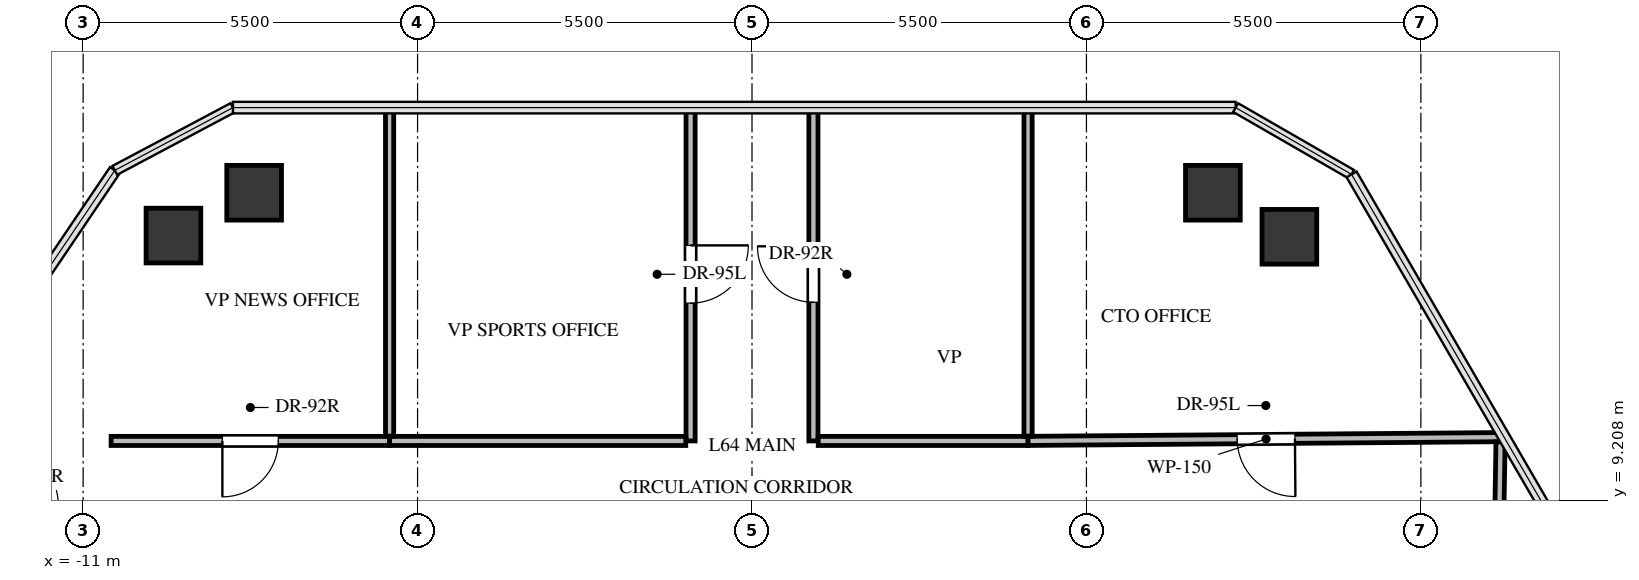
"""IFC4 building model, lengths in metres.
Left out: names, types, materials, properties, quantities, classifications, styles, units other than length and angle.
Written with IfcOpenShell. Run it as: python <this file> out.ifc"""

import sys

from ifc_helpers import new_model, si_unit, direction, frame, frame_2d, origin, origin_2d, place, context, subcontext, project, spatial, rectangle, extrude, source, transform, mapped, element, fill, save


model = new_model("IFC4")
c1 = context("Model", 3, precision=1e-05, world=origin(), true_north=direction((0.0, 1.0)))
c2 = subcontext(c1, "Body", "Model", "MODEL_VIEW")
j1 = project(units=[si_unit("LENGTHUNIT", "METRE"), si_unit("PLANEANGLEUNIT", "RADIAN")], contexts=[c1])
p1 = place(None, origin())
s1 = spatial("IfcSite", under=j1, at=p1, CompositionType="ELEMENT")
p2 = place(p1, origin())
s2 = spatial("IfcBuilding", under=s1, at=p2, CompositionType="ELEMENT")
p3 = place(p2, frame((0.0, 0.0, 231.5)))
s3 = spatial("IfcBuildingStorey", under=s2, at=p3, CompositionType="ELEMENT", Elevation=231.5)
m1 = source(origin(), c2, "Body", "SweptSolid", [
    extrude(rectangle(XDim=0.9, YDim=0.9, at=origin_2d()), origin(), (0.0, 0.0, 1.0), 3.3),
])
for number, where, z_axis, x_axis in (
    (1, (-9.515, 13.557, -0.24), (0.0, 0.0, 1.0), (1.0, 0.0, 0.0)),
    (2, (-8.188, 14.262, -0.24), (0.0, 0.0, 1.0), (1.0, 0.0, 0.0)),
    (3, (7.58, 14.262, -0.24), (0.0, 0.0, 1.0), (1.0, 0.0, 0.0)),
    (4, (8.837, 13.538, -0.24), (0.0, 0.0, 1.0), (1.0, 0.0, 0.0)),
):
    element("IfcColumn", number, at=place(p3, frame(where, z_axis=z_axis, x_axis=x_axis)), inside=s3, PredefinedType="COLUMN", context=c2, shape_type="MappedRepresentation", body=[
        mapped(m1, transform((0.0, 0.0, 0.0), x_axis=(1.0, 0.0, 0.0), y_axis=(0.0, 1.0, 0.0), z_axis=(0.0, 0.0, 1.0), scale=1.0)),
    ])
p4 = place(p3, frame((-5.96, 10.18, 0.0), z_axis=(0.0, 0.0, 1.0), x_axis=(-1.0, 0.0, 0.0)))
e5 = element("IfcWall", 5, at=p4, inside=s3, PredefinedType="PARTITIONING", context=c2, shape_type="SweptSolid", body=[
    extrude(rectangle(XDim=4.58, YDim=0.15, at=frame_2d((2.29, 0.0))), origin(), (0.0, 0.0, 1.0), 2.301),
])
p5 = place(p4, frame((1.83, 0.0, 0.0)))
e6 = element("IfcOpeningElement", 6, at=p5, cuts=e5, PredefinedType="OPENING", context=c2, shape_type="SweptSolid", body=[
    extrude(rectangle(XDim=0.92, YDim=2.1, at=frame_2d((0.46, 1.05))), frame((0.0, 0.085, 0.0), z_axis=(0.0, -1.0, 0.0), x_axis=(1.0, 0.0, 0.0)), (0.0, 0.0, 1.0), 0.17),
])
p6 = place(p3, frame((-1.01, 15.662, 0.0), z_axis=(0.0, 0.0, 1.0), x_axis=(0.0, -1.0, 0.0)))
e7 = element("IfcWall", 7, at=p6, inside=s3, PredefinedType="PARTITIONING", context=c2, shape_type="SweptSolid", body=[
    extrude(rectangle(XDim=5.482, YDim=0.15, at=frame_2d((2.741, 0.0))), origin(), (0.0, 0.0, 1.0), 2.399),
])
p7 = place(p6, frame((2.266, 0.0, 0.0)))
e8 = element("IfcOpeningElement", 8, at=p7, cuts=e7, PredefinedType="OPENING", context=c2, shape_type="SweptSolid", body=[
    extrude(rectangle(XDim=0.95, YDim=2.1, at=frame_2d((0.475, 1.05))), frame((0.0, 0.085, 0.0), z_axis=(0.0, -1.0, 0.0), x_axis=(1.0, 0.0, 0.0)), (0.0, 0.0, 1.0), 0.17),
])
p8 = place(p3, frame((-1.089, 10.18, 0.0), z_axis=(0.0, 0.0, 1.0), x_axis=(-1.0, 0.0, 0.0)))
e9 = element("IfcWall", 9, at=p8, inside=s3, PredefinedType="PARTITIONING", context=c2, shape_type="SweptSolid", body=[
    extrude(rectangle(XDim=4.871, YDim=0.15, at=frame_2d((2.436, 0.0))), origin(), (0.0, 0.0, 1.0), 2.608),
])
p9 = place(p3, frame((1.01, 10.18, 0.0), z_axis=(0.0, 0.0, 1.0), x_axis=(0.0, 1.0, 0.0)))
e10 = element("IfcWall", 10, at=p9, inside=s3, PredefinedType="PARTITIONING", context=c2, shape_type="SweptSolid", body=[
    extrude(rectangle(XDim=5.482, YDim=0.15, at=frame_2d((2.741, 0.0))), origin(), (0.0, 0.0, 1.0), 2.399),
])
p10 = place(p9, frame((2.281, 0.0, 0.0)))
e11 = element("IfcOpeningElement", 11, at=p10, cuts=e10, PredefinedType="OPENING", context=c2, shape_type="SweptSolid", body=[
    extrude(rectangle(XDim=0.92, YDim=2.1, at=frame_2d((0.46, 1.05))), frame((0.0, 0.085, 0.0), z_axis=(0.0, -1.0, 0.0), x_axis=(1.0, 0.0, 0.0)), (0.0, 0.0, 1.0), 0.17),
])
p11 = place(p3, frame((4.54, 10.18, 0.0), z_axis=(0.0, 0.0, 1.0), x_axis=(-1.0, 0.0, 0.0)))
e12 = element("IfcWall", 12, at=p11, inside=s3, PredefinedType="PARTITIONING", context=c2, shape_type="SweptSolid", body=[
    extrude(rectangle(XDim=3.451, YDim=0.15, at=frame_2d((1.726, 0.0))), origin(), (0.0, 0.0, 1.0), 3.045),
])
p12 = place(p3, frame((12.368, 10.243, 0.0), z_axis=(0.0, 0.0, 1.0), x_axis=(-0.999968379606, -0.007952344825, 0.0)))
e13 = element("IfcWall", 13, at=p12, inside=s3, PredefinedType="PARTITIONING", context=c2, shape_type="SweptSolid", body=[
    extrude(rectangle(XDim=7.829, YDim=0.15, at=frame_2d((3.914, 0.0))), origin(), (0.0, 0.0, 1.0), 2.301),
])
p13 = place(p12, frame((3.439, 0.0, 0.0)))
e14 = element("IfcOpeningElement", 14, at=p13, cuts=e13, PredefinedType="OPENING", context=c2, shape_type="SweptSolid", body=[
    extrude(rectangle(XDim=0.95, YDim=2.1, at=frame_2d((0.475, 1.05))), frame((0.0, 0.085, 0.0), z_axis=(0.0, -1.0, 0.0), x_axis=(1.0, 0.0, 0.0)), (0.0, 0.0, 1.0), 0.17),
])
p14 = place(p3, frame((12.181, 2.49, 0.0), z_axis=(0.0, 0.0, 1.0), x_axis=(0.016828669653, 0.999858387912, 0.0)))
e15 = element("IfcWall", 15, at=p14, inside=s3, PredefinedType="PARTITIONING", context=c2, shape_type="SweptSolid", body=[
    extrude(rectangle(XDim=7.674, YDim=0.15, at=frame_2d((3.837, 0.0))), origin(), (0.0, 0.0, 1.0), 2.399),
])
p15 = place(p14, frame((3.362, 0.0, 0.0)))
e16 = element("IfcOpeningElement", 16, at=p15, cuts=e15, PredefinedType="OPENING", context=c2, shape_type="SweptSolid", body=[
    extrude(rectangle(XDim=0.95, YDim=2.1, at=frame_2d((0.475, 1.05))), frame((0.0, 0.085, 0.0), z_axis=(0.0, -1.0, 0.0), x_axis=(1.0, 0.0, 0.0)), (0.0, 0.0, 1.0), 0.17),
])
p16 = place(p3, frame((-5.96, 15.662, 0.0), z_axis=(0.0, 0.0, 1.0), x_axis=(0.0, -1.0, 0.0)))
e17 = element("IfcWall", 17, at=p16, inside=s3, PredefinedType="PARTITIONING", context=c2, shape_type="SweptSolid", body=[
    extrude(rectangle(XDim=5.403, YDim=0.135, at=frame_2d((2.702, 0.0))), origin(), (0.0, 0.0, 1.0), 2.399),
])
p17 = place(p3, frame((4.54, 15.662, 0.0), z_axis=(0.0, 0.0, 1.0), x_axis=(0.0, -1.0, 0.0)))
e18 = element("IfcWall", 18, at=p17, inside=s3, PredefinedType="PARTITIONING", context=c2, shape_type="SweptSolid", body=[
    extrude(rectangle(XDim=5.403, YDim=0.135, at=frame_2d((2.701, 0.0))), origin(), (0.0, 0.0, 1.0), 2.399),
])
m2 = source(origin(), c2, "Body", "SweptSolid", [
    extrude(rectangle(XDim=0.92, YDim=2.1, at=frame_2d((0.46, 1.05))), frame((0.0, 0.025, 0.0), z_axis=(0.0, -1.0, 0.0), x_axis=(1.0, 0.0, 0.0)), (0.0, 0.0, 1.0), 0.05),
])
p18 = place(p5, origin())
e19 = element("IfcDoor", 19, at=p18, inside=s3, OperationType="SINGLE_SWING_RIGHT", PredefinedType="DOOR", context=c2, shape_type="MappedRepresentation", body=[
    mapped(m2, transform((0.0, 0.0, 0.0), x_axis=(1.0, 0.0, 0.0), y_axis=(0.0, 1.0, 0.0), z_axis=(0.0, 0.0, 1.0), scale=1.0)),
])
fill(e6, e19)
m3 = source(origin(), c2, "Body", "SweptSolid", [
    extrude(rectangle(XDim=0.95, YDim=2.1, at=frame_2d((0.475, 1.05))), frame((0.0, 0.025, 0.0), z_axis=(0.0, -1.0, 0.0), x_axis=(1.0, 0.0, 0.0)), (0.0, 0.0, 1.0), 0.05),
])
p19 = place(p7, origin())
e20 = element("IfcDoor", 20, at=p19, inside=s3, OperationType="SINGLE_SWING_LEFT", PredefinedType="DOOR", context=c2, shape_type="MappedRepresentation", body=[
    mapped(m3, transform((0.0, 0.0, 0.0), x_axis=(1.0, 0.0, 0.0), y_axis=(0.0, 1.0, 0.0), z_axis=(0.0, 0.0, 1.0), scale=1.0)),
])
fill(e8, e20)
p20 = place(p10, origin())
e21 = element("IfcDoor", 21, at=p20, inside=s3, OperationType="SINGLE_SWING_RIGHT", PredefinedType="DOOR", context=c2, shape_type="MappedRepresentation", body=[
    mapped(m2, transform((0.0, 0.0, 0.0), x_axis=(1.0, 0.0, 0.0), y_axis=(0.0, 1.0, 0.0), z_axis=(0.0, 0.0, 1.0), scale=1.0)),
])
fill(e11, e21)
p21 = place(p13, origin())
e22 = element("IfcDoor", 22, at=p21, inside=s3, OperationType="SINGLE_SWING_LEFT", PredefinedType="DOOR", context=c2, shape_type="MappedRepresentation", body=[
    mapped(m3, transform((0.0, 0.0, 0.0), x_axis=(1.0, 0.0, 0.0), y_axis=(0.0, 1.0, 0.0), z_axis=(0.0, 0.0, 1.0), scale=1.0)),
])
fill(e14, e22)
save(model, sys.argv[1])
